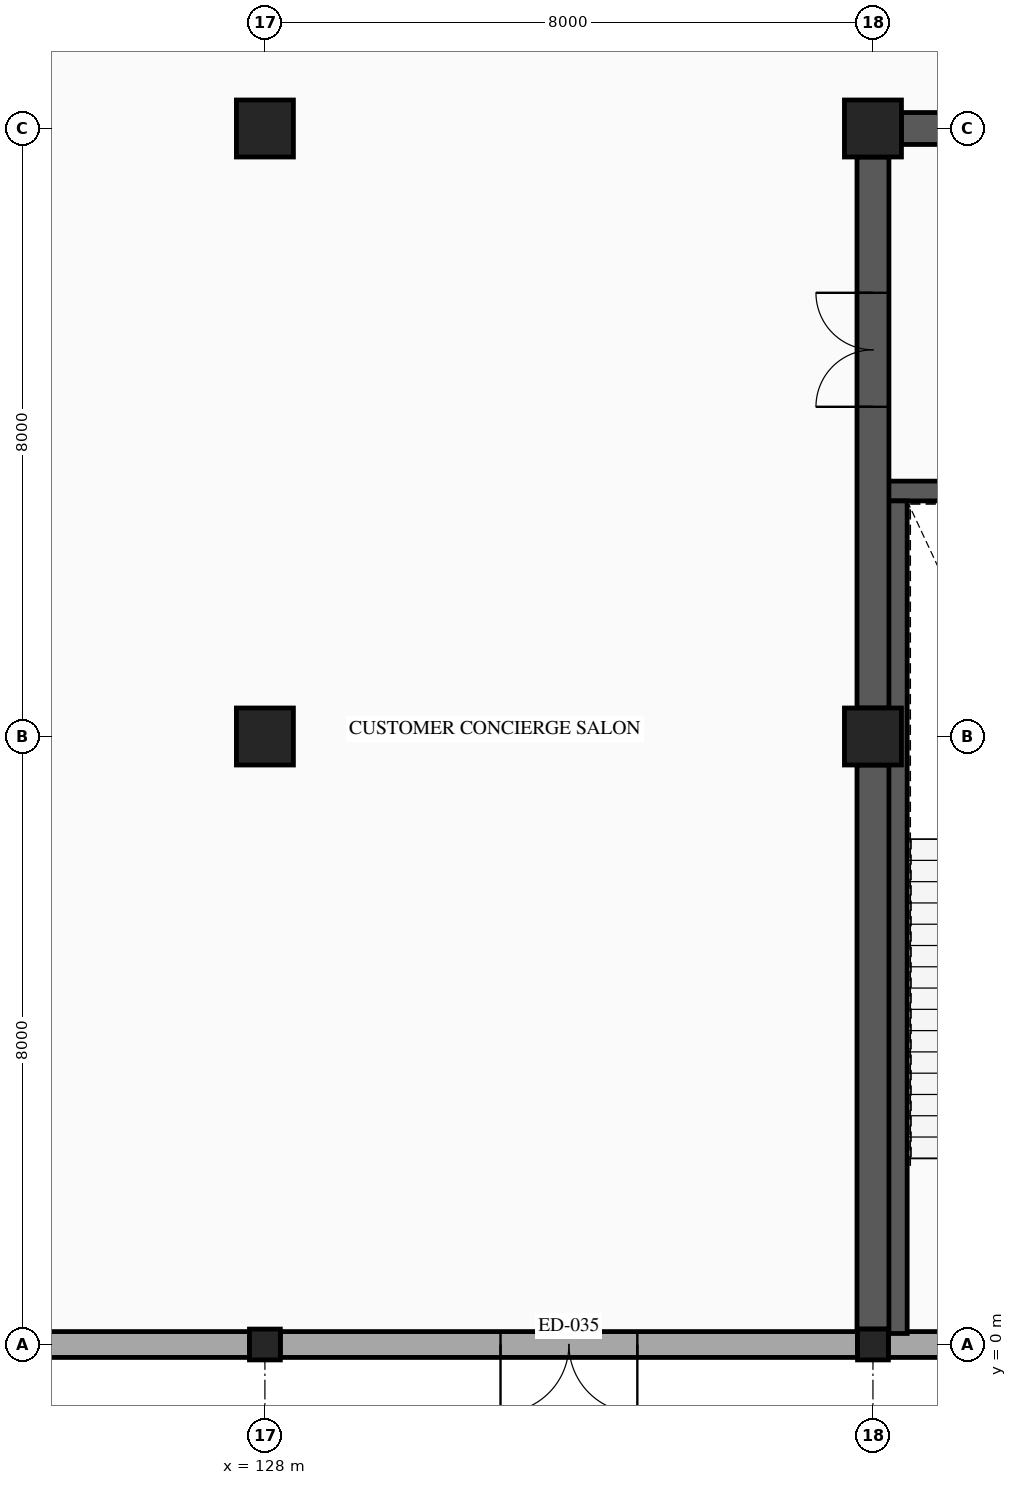
"""IFC4 building model, lengths in metres.
Left out: names, types, materials, properties, quantities, classifications, styles, units other than length and angle.
Written with IfcOpenShell. Run it as: python <this file> out.ifc"""

import sys

from ifc_helpers import new_model, si_unit, direction, frame, frame_2d, origin, origin_2d, place, context, subcontext, project, spatial, rectangle, hollow_rectangle, extrude, element, fill, save


model = new_model("IFC4")
c1 = context("Model", 3, precision=1e-05, world=origin(), true_north=direction((0.0, 1.0)))
c2 = subcontext(c1, "Body", "Model", "MODEL_VIEW")
j1 = project(units=[si_unit("LENGTHUNIT", "METRE"), si_unit("PLANEANGLEUNIT", "RADIAN")], contexts=[c1])
p1 = place(None, origin())
s1 = spatial("IfcSite", under=j1, at=p1, CompositionType="ELEMENT")
p2 = place(p1, origin())
s2 = spatial("IfcBuilding", under=s1, at=p2, CompositionType="ELEMENT")
p3 = place(p2, origin())
s3 = spatial("IfcBuildingStorey", under=s2, at=p3, CompositionType="ELEMENT", Elevation=0.0)
p4 = place(p3, frame((128.0, 0.0, 0.0), z_axis=(0.0, 0.0, 1.0), x_axis=(1.0, 0.0, 0.0)))
e1 = element("IfcColumn", 1, at=p4, inside=s3, PredefinedType="COLUMN", context=c2, shape_type="SweptSolid", body=[
    extrude(hollow_rectangle(XDim=0.406, YDim=0.406, WallThickness=0.015, InnerFilletRadius=0.015, OuterFilletRadius=0.029, at=origin_2d()), origin(), (0.0, 0.0, 1.0), 5.6),
])
for number, where, z_axis, x_axis in (
    (2, (128.0, 8.0, 0.0), (0.0, 0.0, 1.0), (1.0, 0.0, 0.0)),
    (3, (128.0, 16.0, 0.0), (0.0, 0.0, 1.0), (1.0, 0.0, 0.0)),
):
    element("IfcColumn", number, at=place(p3, frame(where, z_axis=z_axis, x_axis=x_axis)), inside=s3, PredefinedType="COLUMN", context=c2, shape_type="SweptSolid", body=[
        extrude(rectangle(XDim=0.75, YDim=0.75, at=origin_2d()), origin(), (0.0, 0.0, 1.0), 5.6),
    ])
p5 = place(p3, frame((136.0, 0.0, 0.0), z_axis=(0.0, 0.0, 1.0), x_axis=(1.0, 0.0, 0.0)))
e4 = element("IfcColumn", 4, at=p5, inside=s3, PredefinedType="COLUMN", context=c2, shape_type="SweptSolid", body=[
    extrude(hollow_rectangle(XDim=0.406, YDim=0.406, WallThickness=0.015, InnerFilletRadius=0.015, OuterFilletRadius=0.029, at=origin_2d()), origin(), (0.0, 0.0, 1.0), 5.6),
])
for number, where, z_axis, x_axis in (
    (5, (136.0, 8.0, 0.0), (0.0, 0.0, 1.0), (1.0, 0.0, 0.0)),
    (6, (136.0, 16.0, 0.0), (0.0, 0.0, 1.0), (1.0, 0.0, 0.0)),
):
    element("IfcColumn", number, at=place(p3, frame(where, z_axis=z_axis, x_axis=x_axis)), inside=s3, PredefinedType="COLUMN", context=c2, shape_type="SweptSolid", body=[
        extrude(rectangle(XDim=0.75, YDim=0.75, at=origin_2d()), origin(), (0.0, 0.0, 1.0), 5.6),
    ])
p6 = place(p3, frame((143.822, 0.0, 0.0), z_axis=(0.0, 0.0, 1.0), x_axis=(-1.0, 0.0, 0.0)))
e7 = element("IfcWall", 7, at=p6, inside=s3, PredefinedType="STANDARD", context=c2, shape_type="SweptSolid", body=[
    extrude(rectangle(XDim=7.619, YDim=0.34, at=frame_2d((3.81, 0.0))), origin(), (0.0, 0.0, 1.0), 4.58),
])
p7 = place(p6, frame((4.919, 0.0, 0.0)))
e8 = element("IfcOpeningElement", 8, at=p7, cuts=e7, PredefinedType="OPENING", context=c2, shape_type="SweptSolid", body=[
    extrude(rectangle(XDim=1.7, YDim=2.15, at=frame_2d((0.85, 1.075))), frame((0.0, 0.18, 0.0), z_axis=(0.0, -1.0, 0.0), x_axis=(1.0, 0.0, 0.0)), (0.0, 0.0, 1.0), 0.36),
])
p8 = place(p3, frame((135.797, 0.0, 0.0), z_axis=(0.0, 0.0, 1.0), x_axis=(-1.0, 0.0, 0.0)))
e9 = element("IfcWall", 9, at=p8, inside=s3, PredefinedType="STANDARD", context=c2, shape_type="SweptSolid", body=[
    extrude(rectangle(XDim=7.594, YDim=0.34, at=frame_2d((3.797, 0.0))), origin(), (0.0, 0.0, 1.0), 4.58),
])
p9 = place(p8, frame((2.897, 0.0, 0.0)))
e10 = element("IfcOpeningElement", 10, at=p9, cuts=e9, PredefinedType="OPENING", context=c2, shape_type="SweptSolid", body=[
    extrude(rectangle(XDim=1.8, YDim=2.3, at=frame_2d((0.9, 1.15))), frame((0.0, 0.18, 0.0), z_axis=(0.0, -1.0, 0.0), x_axis=(1.0, 0.0, 0.0)), (0.0, 0.0, 1.0), 0.36),
])
p10 = place(p3, frame((127.797, 0.0, 0.0), z_axis=(0.0, 0.0, 1.0), x_axis=(-1.0, 0.0, 0.0)))
e11 = element("IfcWall", 11, at=p10, inside=s3, PredefinedType="STANDARD", context=c2, shape_type="SweptSolid", body=[
    extrude(rectangle(XDim=7.594, YDim=0.34, at=frame_2d((3.797, 0.0))), origin(), (0.0, 0.0, 1.0), 4.58),
])
p11 = place(p3, frame((136.19, 11.23, 0.0), z_axis=(0.0, 0.0, 1.0), x_axis=(1.0, 0.0, 0.0)))
e12 = element("IfcWall", 12, at=p11, inside=s3, PredefinedType="SHEAR", context=c2, shape_type="SweptSolid", body=[
    extrude(rectangle(XDim=4.57, YDim=0.26, at=frame_2d((2.285, 0.0))), origin(), (0.0, 0.0, 1.0), 5.38),
])
p12 = place(p3, frame((136.32, 0.145, 0.0), z_axis=(0.0, 0.0, 1.0), x_axis=(0.0, 1.0, 0.0)))
e13 = element("IfcWall", 13, at=p12, inside=s3, PredefinedType="SHEAR", context=c2, shape_type="SweptSolid", body=[
    extrude(rectangle(XDim=10.955, YDim=0.26, at=frame_2d((5.478, 0.0))), origin(), (0.0, 0.0, 1.0), 5.38),
])
p13 = place(p3, frame((136.375, 16.0, 0.0), z_axis=(0.0, 0.0, 1.0), x_axis=(1.0, 0.0, 0.0)))
e14 = element("IfcWall", 14, at=p13, inside=s3, PredefinedType="SHEAR", context=c2, shape_type="SweptSolid", body=[
    extrude(rectangle(XDim=7.447, YDim=0.42, at=frame_2d((3.724, 0.0))), origin(), (0.0, 0.0, 1.0), 5.38),
])
p14 = place(p13, frame((2.974, 0.0, 0.0)))
e15 = element("IfcOpeningElement", 15, at=p14, cuts=e14, PredefinedType="OPENING", context=c2, shape_type="SweptSolid", body=[
    extrude(rectangle(XDim=1.5, YDim=2.15, at=frame_2d((0.75, 1.075))), frame((0.0, 0.22, 0.0), z_axis=(0.0, -1.0, 0.0), x_axis=(1.0, 0.0, 0.0)), (0.0, 0.0, 1.0), 0.44),
])
p15 = place(p3, frame((136.0, 0.203, 0.0), z_axis=(0.0, 0.0, 1.0), x_axis=(0.0, 1.0, 0.0)))
e16 = element("IfcWall", 16, at=p15, inside=s3, PredefinedType="SHEAR", context=c2, shape_type="SweptSolid", body=[
    extrude(rectangle(XDim=7.422, YDim=0.42, at=frame_2d((3.711, 0.0))), origin(), (0.0, 0.0, 1.0), 5.38),
])
p16 = place(p3, frame((136.0, 8.375, 0.0), z_axis=(0.0, 0.0, 1.0), x_axis=(0.0, 1.0, 0.0)))
e17 = element("IfcWall", 17, at=p16, inside=s3, PredefinedType="SHEAR", context=c2, shape_type="SweptSolid", body=[
    extrude(rectangle(XDim=7.25, YDim=0.42, at=frame_2d((3.625, 0.0))), origin(), (0.0, 0.0, 1.0), 5.38),
])
p17 = place(p16, frame((3.963, 0.0, 0.0)))
e18 = element("IfcOpeningElement", 18, at=p17, cuts=e17, PredefinedType="OPENING", context=c2, shape_type="SweptSolid", body=[
    extrude(rectangle(XDim=1.5, YDim=2.15, at=frame_2d((0.75, 1.075))), frame((0.0, 0.22, 0.0), z_axis=(0.0, -1.0, 0.0), x_axis=(1.0, 0.0, 0.0)), (0.0, 0.0, 1.0), 0.44),
])
p18 = place(p9, origin())
e19 = element("IfcDoor", 19, at=p18, inside=s3, OperationType="DOUBLE_DOOR_SINGLE_SWING", PredefinedType="DOOR", context=c2, shape_type="SweptSolid", body=[
    extrude(rectangle(XDim=1.8, YDim=2.3, at=frame_2d((0.9, 1.15))), frame((0.0, 0.025, 0.0), z_axis=(0.0, -1.0, 0.0), x_axis=(1.0, 0.0, 0.0)), (0.0, 0.0, 1.0), 0.05),
])
fill(e10, e19)
p19 = place(p17, origin())
e20 = element("IfcDoor", 20, at=p19, inside=s3, OperationType="DOUBLE_DOOR_SINGLE_SWING", PredefinedType="DOOR", context=c2, shape_type="SweptSolid", body=[
    extrude(rectangle(XDim=1.5, YDim=2.15, at=frame_2d((0.75, 1.075))), frame((0.0, 0.025, 0.0), z_axis=(0.0, -1.0, 0.0), x_axis=(1.0, 0.0, 0.0)), (0.0, 0.0, 1.0), 0.05),
])
fill(e18, e20)
save(model, sys.argv[1])
